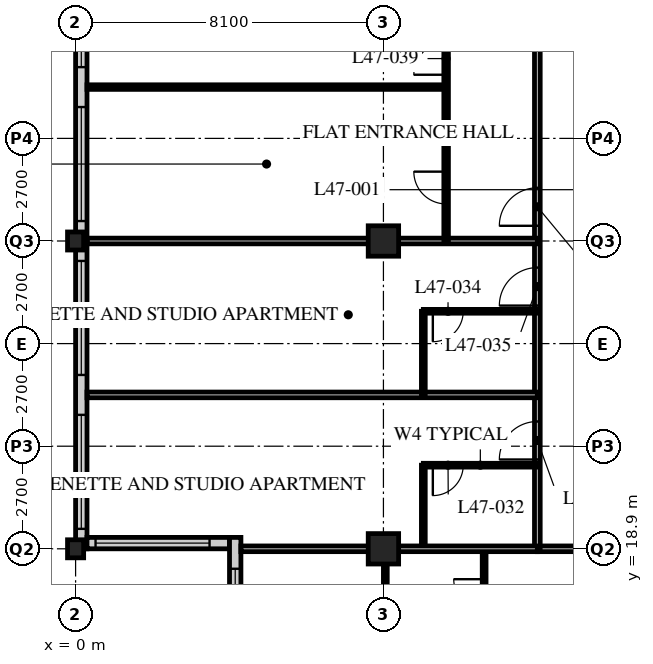
"""IFC4 building model, lengths in metres.
Left out: names, types, materials, properties, quantities, classifications, styles, units other than length and angle.
Written with IfcOpenShell. Run it as: python <this file> out.ifc"""

import sys

from ifc_helpers import new_model, si_unit, direction, frame, frame_2d, origin, origin_2d, place, context, subcontext, project, spatial, rectangle, hollow_rectangle, i_section, extrude, element, fill, save


model = new_model("IFC4")
c1 = context("Model", 3, precision=1e-05, world=origin(), true_north=direction((0.0, 1.0)))
c2 = subcontext(c1, "Body", "Model", "MODEL_VIEW")
j1 = project(units=[si_unit("LENGTHUNIT", "METRE"), si_unit("PLANEANGLEUNIT", "RADIAN")], contexts=[c1])
p1 = place(None, origin())
s1 = spatial("IfcSite", under=j1, at=p1, CompositionType="ELEMENT")
p2 = place(p1, origin())
s2 = spatial("IfcBuilding", under=s1, at=p2, CompositionType="ELEMENT")
p3 = place(p2, frame((0.0, 0.0, 184.8)))
s3 = spatial("IfcBuildingStorey", under=s2, at=p3, CompositionType="ELEMENT", Elevation=184.8)
for number, where, z_axis, x_axis in (
    (1, (0.0, 18.9, 0.0), (0.0, 0.0, 1.0), (1.0, 0.0, 0.0)),
    (2, (0.0, 27.0, 0.0), (0.0, 0.0, 1.0), (1.0, 0.0, 0.0)),
):
    element("IfcColumn", number, at=place(p3, frame(where, z_axis=z_axis, x_axis=x_axis)), inside=s3, PredefinedType="COLUMN", context=c2, shape_type="SweptSolid", body=[
        extrude(i_section(OverallWidth=0.424, OverallDepth=0.475, WebThickness=0.048, FlangeThickness=0.077, FilletRadius=0.015, at=origin_2d()), origin(), (0.0, 0.0, 1.0), 3.6),
    ])
for number, where, z_axis, x_axis in (
    (3, (8.1, 18.9, 0.0), (0.0, 0.0, 1.0), (1.0, 0.0, 0.0)),
    (4, (8.1, 27.0, 0.0), (0.0, 0.0, 1.0), (1.0, 0.0, 0.0)),
):
    element("IfcColumn", number, at=place(p3, frame(where, z_axis=z_axis, x_axis=x_axis)), inside=s3, PredefinedType="COLUMN", context=c2, shape_type="SweptSolid", body=[
        extrude(hollow_rectangle(XDim=0.8, YDim=0.8, WallThickness=0.08, at=origin_2d()), origin(), (0.0, 0.0, 1.0), 3.6),
    ])
p4 = place(p3, frame((0.15, 51.0, 0.0), z_axis=(0.0, 0.0, 1.0), x_axis=(0.0, -1.0, 0.0)))
e5 = element("IfcWall", 5, at=p4, inside=s3, PredefinedType="SOLIDWALL", context=c2, shape_type="SweptSolid", body=[
    extrude(rectangle(XDim=32.1, YDim=0.3, at=frame_2d((16.05, 0.0))), origin(), (0.0, 0.0, 1.0), 3.39),
])
p5 = place(p4, frame((0.225, 0.0, 0.6)))
e6 = element("IfcOpeningElement", 6, at=p5, cuts=e5, PredefinedType="OPENING", context=c2, shape_type="SweptSolid", body=[
    extrude(rectangle(XDim=3.0, YDim=2.4, at=frame_2d((1.5, 1.2))), frame((0.0, 0.16, 0.0), z_axis=(0.0, -1.0, 0.0), x_axis=(1.0, 0.0, 0.0)), (0.0, 0.0, 1.0), 0.32),
])
p6 = place(p4, frame((4.275, 0.0, 0.6)))
e7 = element("IfcOpeningElement", 7, at=p6, cuts=e5, PredefinedType="OPENING", context=c2, shape_type="SweptSolid", body=[
    extrude(rectangle(XDim=3.0, YDim=2.4, at=frame_2d((1.5, 1.2))), frame((0.0, 0.16, 0.0), z_axis=(0.0, -1.0, 0.0), x_axis=(1.0, 0.0, 0.0)), (0.0, 0.0, 1.0), 0.32),
])
p7 = place(p4, frame((8.325, 0.0, 0.6)))
e8 = element("IfcOpeningElement", 8, at=p7, cuts=e5, PredefinedType="OPENING", context=c2, shape_type="SweptSolid", body=[
    extrude(rectangle(XDim=3.0, YDim=2.4, at=frame_2d((1.5, 1.2))), frame((0.0, 0.16, 0.0), z_axis=(0.0, -1.0, 0.0), x_axis=(1.0, 0.0, 0.0)), (0.0, 0.0, 1.0), 0.32),
])
p8 = place(p4, frame((12.375, 0.0, 0.6)))
e9 = element("IfcOpeningElement", 9, at=p8, cuts=e5, PredefinedType="OPENING", context=c2, shape_type="SweptSolid", body=[
    extrude(rectangle(XDim=3.0, YDim=2.4, at=frame_2d((1.5, 1.2))), frame((0.0, 0.16, 0.0), z_axis=(0.0, -1.0, 0.0), x_axis=(1.0, 0.0, 0.0)), (0.0, 0.0, 1.0), 0.32),
])
p9 = place(p4, frame((16.425, 0.0, 0.6)))
e10 = element("IfcOpeningElement", 10, at=p9, cuts=e5, PredefinedType="OPENING", context=c2, shape_type="SweptSolid", body=[
    extrude(rectangle(XDim=3.0, YDim=2.4, at=frame_2d((1.5, 1.2))), frame((0.0, 0.16, 0.0), z_axis=(0.0, -1.0, 0.0), x_axis=(1.0, 0.0, 0.0)), (0.0, 0.0, 1.0), 0.32),
])
p10 = place(p4, frame((20.475, 0.0, 0.6)))
e11 = element("IfcOpeningElement", 11, at=p10, cuts=e5, PredefinedType="OPENING", context=c2, shape_type="SweptSolid", body=[
    extrude(rectangle(XDim=3.0, YDim=2.4, at=frame_2d((1.5, 1.2))), frame((0.0, 0.16, 0.0), z_axis=(0.0, -1.0, 0.0), x_axis=(1.0, 0.0, 0.0)), (0.0, 0.0, 1.0), 0.32),
])
p11 = place(p4, frame((24.525, 0.0, 0.6)))
e12 = element("IfcOpeningElement", 12, at=p11, cuts=e5, PredefinedType="OPENING", context=c2, shape_type="SweptSolid", body=[
    extrude(rectangle(XDim=3.0, YDim=2.4, at=frame_2d((1.5, 1.2))), frame((0.0, 0.16, 0.0), z_axis=(0.0, -1.0, 0.0), x_axis=(1.0, 0.0, 0.0)), (0.0, 0.0, 1.0), 0.32),
])
p12 = place(p4, frame((28.575, 0.0, 0.6)))
e13 = element("IfcOpeningElement", 13, at=p12, cuts=e5, PredefinedType="OPENING", context=c2, shape_type="SweptSolid", body=[
    extrude(rectangle(XDim=3.0, YDim=2.4, at=frame_2d((1.5, 1.2))), frame((0.0, 0.16, 0.0), z_axis=(0.0, -1.0, 0.0), x_axis=(1.0, 0.0, 0.0)), (0.0, 0.0, 1.0), 0.32),
])
p13 = place(p3, frame((0.3, 19.05, 0.0), z_axis=(0.0, 0.0, 1.0), x_axis=(1.0, 0.0, 0.0)))
e14 = element("IfcWall", 14, at=p13, inside=s3, PredefinedType="SOLIDWALL", context=c2, shape_type="SweptSolid", body=[
    extrude(rectangle(XDim=3.75, YDim=0.3, at=frame_2d((1.875, 0.0))), origin(), (0.0, 0.0, 1.0), 3.39),
])
p14 = place(p13, frame((0.225, 0.0, 0.6)))
e15 = element("IfcOpeningElement", 15, at=p14, cuts=e14, PredefinedType="OPENING", context=c2, shape_type="SweptSolid", body=[
    extrude(rectangle(XDim=3.0, YDim=2.0, at=frame_2d((1.5, 1.0))), frame((0.0, 0.16, 0.0), z_axis=(0.0, -1.0, 0.0), x_axis=(1.0, 0.0, 0.0)), (0.0, 0.0, 1.0), 0.32),
])
p15 = place(p3, frame((4.2, 19.2, 0.0), z_axis=(0.0, 0.0, 1.0), x_axis=(0.0, -1.0, 0.0)))
e16 = element("IfcWall", 16, at=p15, inside=s3, PredefinedType="SOLIDWALL", context=c2, shape_type="SweptSolid", body=[
    extrude(rectangle(XDim=4.35, YDim=0.3, at=frame_2d((2.175, 0.0))), origin(), (0.0, 0.0, 1.0), 3.39),
])
p16 = place(p15, frame((0.825, 0.0, 0.6)))
e17 = element("IfcOpeningElement", 17, at=p16, cuts=e16, PredefinedType="OPENING", context=c2, shape_type="SweptSolid", body=[
    extrude(rectangle(XDim=3.0, YDim=2.0, at=frame_2d((1.5, 1.0))), frame((0.0, 0.16, 0.0), z_axis=(0.0, -1.0, 0.0), x_axis=(1.0, 0.0, 0.0)), (0.0, 0.0, 1.0), 0.32),
])
p17 = place(p3, frame((12.15, 18.9, 0.0), z_axis=(0.0, 0.0, 1.0), x_axis=(1.0, 0.0, 0.0)))
e18 = element("IfcWall", 18, at=p17, inside=s3, PredefinedType="PARTITIONING", context=c2, shape_type="SweptSolid", body=[
    extrude(rectangle(XDim=32.4, YDim=0.15, at=frame_2d((16.2, 0.0))), origin(), (0.0, 0.0, 1.0), 2.778),
])
p18 = place(p17, frame((4.95, 0.0, 0.0)))
e19 = element("IfcOpeningElement", 19, at=p18, cuts=e18, PredefinedType="OPENING", context=c2, shape_type="SweptSolid", body=[
    extrude(rectangle(XDim=1.0, YDim=2.1, at=frame_2d((0.5, 1.05))), frame((0.0, 0.085, 0.0), z_axis=(0.0, -1.0, 0.0), x_axis=(1.0, 0.0, 0.0)), (0.0, 0.0, 1.0), 0.17),
])
p19 = place(p17, frame((13.05, 0.0, 0.0)))
e20 = element("IfcOpeningElement", 20, at=p19, cuts=e18, PredefinedType="OPENING", context=c2, shape_type="SweptSolid", body=[
    extrude(rectangle(XDim=1.0, YDim=2.1, at=frame_2d((0.5, 1.05))), frame((0.0, 0.085, 0.0), z_axis=(0.0, -1.0, 0.0), x_axis=(1.0, 0.0, 0.0)), (0.0, 0.0, 1.0), 0.17),
])
p20 = place(p17, frame((21.15, 0.0, 0.0)))
e21 = element("IfcOpeningElement", 21, at=p20, cuts=e18, PredefinedType="OPENING", context=c2, shape_type="SweptSolid", body=[
    extrude(rectangle(XDim=1.0, YDim=2.1, at=frame_2d((0.5, 1.05))), frame((0.0, 0.085, 0.0), z_axis=(0.0, -1.0, 0.0), x_axis=(1.0, 0.0, 0.0)), (0.0, 0.0, 1.0), 0.17),
])
p21 = place(p17, frame((1.525, 0.0, 0.0)))
e22 = element("IfcOpeningElement", 22, at=p21, cuts=e18, PredefinedType="OPENING", context=c2, shape_type="SweptSolid", body=[
    extrude(rectangle(XDim=1.0, YDim=2.1, at=frame_2d((0.5, 1.05))), frame((0.0, 0.085, 0.0), z_axis=(0.0, -1.0, 0.0), x_axis=(1.0, 0.0, 0.0)), (0.0, 0.0, 1.0), 0.17),
])
p22 = place(p17, frame((29.875, 0.0, 0.0)))
e23 = element("IfcOpeningElement", 23, at=p22, cuts=e18, PredefinedType="OPENING", context=c2, shape_type="SweptSolid", body=[
    extrude(rectangle(XDim=1.0, YDim=2.1, at=frame_2d((0.5, 1.05))), frame((0.0, 0.085, 0.0), z_axis=(0.0, -1.0, 0.0), x_axis=(1.0, 0.0, 0.0)), (0.0, 0.0, 1.0), 0.17),
])
p23 = place(p3, frame((12.15, 18.9, 0.0), z_axis=(0.0, 0.0, 1.0), x_axis=(0.0, 1.0, 0.0)))
e24 = element("IfcWall", 24, at=p23, inside=s3, PredefinedType="PARTITIONING", context=c2, shape_type="SweptSolid", body=[
    extrude(rectangle(XDim=28.35, YDim=0.15, at=frame_2d((14.175, 0.0))), origin(), (0.0, 0.0, 1.0), 3.39),
])
p24 = place(p23, frame((2.35, 0.0, 0.0)))
e25 = element("IfcOpeningElement", 25, at=p24, cuts=e24, PredefinedType="OPENING", context=c2, shape_type="SweptSolid", body=[
    extrude(rectangle(XDim=1.0, YDim=2.1, at=frame_2d((0.5, 1.05))), frame((0.0, 0.085, 0.0), z_axis=(0.0, -1.0, 0.0), x_axis=(1.0, 0.0, 0.0)), (0.0, 0.0, 1.0), 0.17),
])
p25 = place(p23, frame((6.4, 0.0, 0.0)))
e26 = element("IfcOpeningElement", 26, at=p25, cuts=e24, PredefinedType="OPENING", context=c2, shape_type="SweptSolid", body=[
    extrude(rectangle(XDim=1.0, YDim=2.1, at=frame_2d((0.5, 1.05))), frame((0.0, 0.085, 0.0), z_axis=(0.0, -1.0, 0.0), x_axis=(1.0, 0.0, 0.0)), (0.0, 0.0, 1.0), 0.17),
])
p26 = place(p23, frame((8.5, 0.0, 0.0)))
e27 = element("IfcOpeningElement", 27, at=p26, cuts=e24, PredefinedType="OPENING", context=c2, shape_type="SweptSolid", body=[
    extrude(rectangle(XDim=1.0, YDim=2.1, at=frame_2d((0.5, 1.05))), frame((0.0, 0.085, 0.0), z_axis=(0.0, -1.0, 0.0), x_axis=(1.0, 0.0, 0.0)), (0.0, 0.0, 1.0), 0.17),
])
p27 = place(p23, frame((16.6, 0.0, 0.0)))
e28 = element("IfcOpeningElement", 28, at=p27, cuts=e24, PredefinedType="OPENING", context=c2, shape_type="SweptSolid", body=[
    extrude(rectangle(XDim=1.0, YDim=2.1, at=frame_2d((0.5, 1.05))), frame((0.0, 0.085, 0.0), z_axis=(0.0, -1.0, 0.0), x_axis=(1.0, 0.0, 0.0)), (0.0, 0.0, 1.0), 0.17),
])
p28 = place(p23, frame((26.65, 0.0, 0.0)))
e29 = element("IfcOpeningElement", 29, at=p28, cuts=e24, PredefinedType="OPENING", context=c2, shape_type="SweptSolid", body=[
    extrude(rectangle(XDim=1.0, YDim=2.1, at=frame_2d((0.5, 1.05))), frame((0.0, 0.085, 0.0), z_axis=(0.0, -1.0, 0.0), x_axis=(1.0, 0.0, 0.0)), (0.0, 0.0, 1.0), 0.17),
])
p29 = place(p3, frame((9.15, 18.9, 0.0), z_axis=(0.0, 0.0, 1.0), x_axis=(0.0, 1.0, 0.0)))
e30 = element("IfcWall", 30, at=p29, inside=s3, PredefinedType="PARTITIONING", context=c2, shape_type="SweptSolid", body=[
    extrude(rectangle(XDim=2.2, YDim=0.1, at=frame_2d((1.1, 0.0))), origin(), (0.0, 0.0, 1.0), 3.39),
])
p30 = place(p3, frame((12.15, 21.1, 0.0), z_axis=(0.0, 0.0, 1.0), x_axis=(-1.0, 0.0, 0.0)))
e31 = element("IfcWall", 31, at=p30, inside=s3, PredefinedType="PARTITIONING", context=c2, shape_type="SweptSolid", body=[
    extrude(rectangle(XDim=3.0, YDim=0.1, at=frame_2d((1.5, 0.0))), origin(), (0.0, 0.0, 1.0), 3.39),
])
p31 = place(p30, frame((1.95, 0.0, 0.0)))
e32 = element("IfcOpeningElement", 32, at=p31, cuts=e31, PredefinedType="OPENING", context=c2, shape_type="SweptSolid", body=[
    extrude(rectangle(XDim=0.8, YDim=2.1, at=frame_2d((0.4, 1.05))), frame((0.0, 0.06, 0.0), z_axis=(0.0, -1.0, 0.0), x_axis=(1.0, 0.0, 0.0)), (0.0, 0.0, 1.0), 0.12),
])
p32 = place(p3, frame((12.15, 22.95, 0.0), z_axis=(0.0, 0.0, 1.0), x_axis=(-1.0, 0.0, 0.0)))
e33 = element("IfcWall", 33, at=p32, inside=s3, PredefinedType="PARTITIONING", context=c2, shape_type="SweptSolid", body=[
    extrude(rectangle(XDim=11.85, YDim=0.15, at=frame_2d((5.925, 0.0))), origin(), (0.0, 0.0, 1.0), 3.39),
])
p33 = place(p3, frame((9.15, 22.95, 0.0), z_axis=(0.0, 0.0, 1.0), x_axis=(0.0, 1.0, 0.0)))
e34 = element("IfcWall", 34, at=p33, inside=s3, PredefinedType="PARTITIONING", context=c2, shape_type="SweptSolid", body=[
    extrude(rectangle(XDim=2.2, YDim=0.1, at=frame_2d((1.1, 0.0))), origin(), (0.0, 0.0, 1.0), 3.39),
])
p34 = place(p3, frame((12.15, 25.15, 0.0), z_axis=(0.0, 0.0, 1.0), x_axis=(-1.0, 0.0, 0.0)))
e35 = element("IfcWall", 35, at=p34, inside=s3, PredefinedType="PARTITIONING", context=c2, shape_type="SweptSolid", body=[
    extrude(rectangle(XDim=3.0, YDim=0.1, at=frame_2d((1.5, 0.0))), origin(), (0.0, 0.0, 1.0), 3.39),
])
p35 = place(p34, frame((1.95, 0.0, 0.0)))
e36 = element("IfcOpeningElement", 36, at=p35, cuts=e35, PredefinedType="OPENING", context=c2, shape_type="SweptSolid", body=[
    extrude(rectangle(XDim=0.8, YDim=2.1, at=frame_2d((0.4, 1.05))), frame((0.0, 0.06, 0.0), z_axis=(0.0, -1.0, 0.0), x_axis=(1.0, 0.0, 0.0)), (0.0, 0.0, 1.0), 0.12),
])
p36 = place(p3, frame((12.15, 27.0, 0.0), z_axis=(0.0, 0.0, 1.0), x_axis=(-1.0, 0.0, 0.0)))
e37 = element("IfcWall", 37, at=p36, inside=s3, PredefinedType="PARTITIONING", context=c2, shape_type="SweptSolid", body=[
    extrude(rectangle(XDim=11.85, YDim=0.15, at=frame_2d((5.925, 0.0))), origin(), (0.0, 0.0, 1.0), 2.778),
])
p37 = place(p3, frame((9.75, 27.0, 0.0), z_axis=(0.0, 0.0, 1.0), x_axis=(0.0, 1.0, 0.0)))
e38 = element("IfcWall", 38, at=p37, inside=s3, PredefinedType="PARTITIONING", context=c2, shape_type="SweptSolid", body=[
    extrude(rectangle(XDim=16.2, YDim=0.12, at=frame_2d((8.1, 0.0))), origin(), (0.0, 0.0, 1.0), 3.39),
])
p38 = place(p37, frame((0.975, 0.0, 0.0)))
e39 = element("IfcOpeningElement", 39, at=p38, cuts=e38, PredefinedType="OPENING", context=c2, shape_type="SweptSolid", body=[
    extrude(rectangle(XDim=0.85, YDim=2.1, at=frame_2d((0.425, 1.05))), frame((0.0, 0.07, 0.0), z_axis=(0.0, -1.0, 0.0), x_axis=(1.0, 0.0, 0.0)), (0.0, 0.0, 1.0), 0.14),
])
p39 = place(p37, frame((4.375, 0.0, 0.0)))
e40 = element("IfcOpeningElement", 40, at=p39, cuts=e38, PredefinedType="OPENING", context=c2, shape_type="SweptSolid", body=[
    extrude(rectangle(XDim=0.85, YDim=2.1, at=frame_2d((0.425, 1.05))), frame((0.0, 0.07, 0.0), z_axis=(0.0, -1.0, 0.0), x_axis=(1.0, 0.0, 0.0)), (0.0, 0.0, 1.0), 0.14),
])
p40 = place(p37, frame((9.075, 0.0, 0.0)))
e41 = element("IfcOpeningElement", 41, at=p40, cuts=e38, PredefinedType="OPENING", context=c2, shape_type="SweptSolid", body=[
    extrude(rectangle(XDim=0.85, YDim=2.1, at=frame_2d((0.425, 1.05))), frame((0.0, 0.07, 0.0), z_axis=(0.0, -1.0, 0.0), x_axis=(1.0, 0.0, 0.0)), (0.0, 0.0, 1.0), 0.14),
])
p41 = place(p37, frame((12.475, 0.0, 0.0)))
e42 = element("IfcOpeningElement", 42, at=p41, cuts=e38, PredefinedType="OPENING", context=c2, shape_type="SweptSolid", body=[
    extrude(rectangle(XDim=0.85, YDim=2.1, at=frame_2d((0.425, 1.05))), frame((0.0, 0.07, 0.0), z_axis=(0.0, -1.0, 0.0), x_axis=(1.0, 0.0, 0.0)), (0.0, 0.0, 1.0), 0.14),
])
p42 = place(p3, frame((9.75, 31.05, 0.0), z_axis=(0.0, 0.0, 1.0), x_axis=(-1.0, 0.0, 0.0)))
e43 = element("IfcWall", 43, at=p42, inside=s3, PredefinedType="PARTITIONING", context=c2, shape_type="SweptSolid", body=[
    extrude(rectangle(XDim=9.45, YDim=0.12, at=frame_2d((4.725, 0.0))), origin(), (0.0, 0.0, 1.0), 3.39),
])
p43 = place(p3, frame((10.75, 18.9, 0.0), z_axis=(0.0, 0.0, 1.0), x_axis=(0.0, -1.0, 0.0)))
e44 = element("IfcWall", 44, at=p43, inside=s3, PredefinedType="PARTITIONING", context=c2, shape_type="SweptSolid", body=[
    extrude(rectangle(XDim=2.4, YDim=0.1, at=frame_2d((1.2, 0.0))), origin(), (0.0, 0.0, 1.0), 3.39),
])
p44 = place(p43, frame((0.8, 0.0, 0.0)))
e45 = element("IfcOpeningElement", 45, at=p44, cuts=e44, PredefinedType="OPENING", context=c2, shape_type="SweptSolid", body=[
    extrude(rectangle(XDim=0.8, YDim=2.1, at=frame_2d((0.4, 1.05))), frame((0.0, 0.06, 0.0), z_axis=(0.0, -1.0, 0.0), x_axis=(1.0, 0.0, 0.0)), (0.0, 0.0, 1.0), 0.12),
])
p45 = place(p3, frame((8.15, 18.9, 0.0), z_axis=(0.0, 0.0, 1.0), x_axis=(0.0, -1.0, 0.0)))
e46 = element("IfcWall", 46, at=p45, inside=s3, PredefinedType="PARTITIONING", context=c2, shape_type="SweptSolid", body=[
    extrude(rectangle(XDim=2.4, YDim=0.1, at=frame_2d((1.2, 0.0))), origin(), (0.0, 0.0, 1.0), 2.778),
])
p46 = place(p3, frame((4.35, 18.9, 0.0), z_axis=(0.0, 0.0, 1.0), x_axis=(1.0, 0.0, 0.0)))
e47 = element("IfcWall", 47, at=p46, inside=s3, PredefinedType="PARTITIONING", context=c2, shape_type="SweptSolid", body=[
    extrude(rectangle(XDim=7.8, YDim=0.15, at=frame_2d((3.9, 0.0))), origin(), (0.0, 0.0, 1.0), 2.778),
])
p47 = place(p9, origin())
e48 = element("IfcWindow", 48, at=p47, inside=s3, PartitioningType="SINGLE_PANEL", PredefinedType="WINDOW", context=c2, shape_type="SweptSolid", body=[
    extrude(rectangle(XDim=3.0, YDim=2.4, at=frame_2d((1.5, 1.2))), frame((0.0, 0.03, 0.0), z_axis=(0.0, -1.0, 0.0), x_axis=(1.0, 0.0, 0.0)), (0.0, 0.0, 1.0), 0.06),
])
fill(e10, e48)
p48 = place(p10, origin())
e49 = element("IfcWindow", 49, at=p48, inside=s3, PartitioningType="SINGLE_PANEL", PredefinedType="WINDOW", context=c2, shape_type="SweptSolid", body=[
    extrude(rectangle(XDim=3.0, YDim=2.4, at=frame_2d((1.5, 1.2))), frame((0.0, 0.03, 0.0), z_axis=(0.0, -1.0, 0.0), x_axis=(1.0, 0.0, 0.0)), (0.0, 0.0, 1.0), 0.06),
])
fill(e11, e49)
p49 = place(p11, origin())
e50 = element("IfcWindow", 50, at=p49, inside=s3, PartitioningType="SINGLE_PANEL", PredefinedType="WINDOW", context=c2, shape_type="SweptSolid", body=[
    extrude(rectangle(XDim=3.0, YDim=2.4, at=frame_2d((1.5, 1.2))), frame((0.0, 0.03, 0.0), z_axis=(0.0, -1.0, 0.0), x_axis=(1.0, 0.0, 0.0)), (0.0, 0.0, 1.0), 0.06),
])
fill(e12, e50)
p50 = place(p12, origin())
e51 = element("IfcWindow", 51, at=p50, inside=s3, PartitioningType="SINGLE_PANEL", PredefinedType="WINDOW", context=c2, shape_type="SweptSolid", body=[
    extrude(rectangle(XDim=3.0, YDim=2.4, at=frame_2d((1.5, 1.2))), frame((0.0, 0.03, 0.0), z_axis=(0.0, -1.0, 0.0), x_axis=(1.0, 0.0, 0.0)), (0.0, 0.0, 1.0), 0.06),
])
fill(e13, e51)
p51 = place(p14, origin())
e52 = element("IfcWindow", 52, at=p51, inside=s3, PartitioningType="SINGLE_PANEL", PredefinedType="WINDOW", context=c2, shape_type="SweptSolid", body=[
    extrude(rectangle(XDim=3.0, YDim=2.0, at=frame_2d((1.5, 1.0))), frame((0.0, 0.03, 0.0), z_axis=(0.0, -1.0, 0.0), x_axis=(1.0, 0.0, 0.0)), (0.0, 0.0, 1.0), 0.06),
])
fill(e15, e52)
p52 = place(p16, origin())
e53 = element("IfcWindow", 53, at=p52, inside=s3, PartitioningType="SINGLE_PANEL", PredefinedType="WINDOW", context=c2, shape_type="SweptSolid", body=[
    extrude(rectangle(XDim=3.0, YDim=2.0, at=frame_2d((1.5, 1.0))), frame((0.0, 0.03, 0.0), z_axis=(0.0, -1.0, 0.0), x_axis=(1.0, 0.0, 0.0)), (0.0, 0.0, 1.0), 0.06),
])
fill(e17, e53)
p53 = place(p31, origin())
e54 = element("IfcDoor", 54, at=p53, inside=s3, OperationType="SINGLE_SWING_RIGHT", PredefinedType="DOOR", context=c2, shape_type="SweptSolid", body=[
    extrude(rectangle(XDim=0.8, YDim=2.1, at=frame_2d((0.4, 1.05))), frame((0.0, 0.025, 0.0), z_axis=(0.0, -1.0, 0.0), x_axis=(1.0, 0.0, 0.0)), (0.0, 0.0, 1.0), 0.05),
])
fill(e32, e54)
p54 = place(p24, origin())
e55 = element("IfcDoor", 55, at=p54, inside=s3, OperationType="SINGLE_SWING_LEFT", PredefinedType="DOOR", context=c2, shape_type="SweptSolid", body=[
    extrude(rectangle(XDim=1.0, YDim=2.1, at=frame_2d((0.5, 1.05))), frame((0.0, 0.025, 0.0), z_axis=(0.0, -1.0, 0.0), x_axis=(1.0, 0.0, 0.0)), (0.0, 0.0, 1.0), 0.05),
])
fill(e25, e55)
p55 = place(p35, origin())
e56 = element("IfcDoor", 56, at=p55, inside=s3, OperationType="SINGLE_SWING_RIGHT", PredefinedType="DOOR", context=c2, shape_type="SweptSolid", body=[
    extrude(rectangle(XDim=0.8, YDim=2.1, at=frame_2d((0.4, 1.05))), frame((0.0, 0.025, 0.0), z_axis=(0.0, -1.0, 0.0), x_axis=(1.0, 0.0, 0.0)), (0.0, 0.0, 1.0), 0.05),
])
fill(e36, e56)
p56 = place(p25, origin())
e57 = element("IfcDoor", 57, at=p56, inside=s3, OperationType="SINGLE_SWING_LEFT", PredefinedType="DOOR", context=c2, shape_type="SweptSolid", body=[
    extrude(rectangle(XDim=1.0, YDim=2.1, at=frame_2d((0.5, 1.05))), frame((0.0, 0.025, 0.0), z_axis=(0.0, -1.0, 0.0), x_axis=(1.0, 0.0, 0.0)), (0.0, 0.0, 1.0), 0.05),
])
fill(e26, e57)
p57 = place(p26, origin())
e58 = element("IfcDoor", 58, at=p57, inside=s3, OperationType="SINGLE_SWING_LEFT", PredefinedType="DOOR", context=c2, shape_type="SweptSolid", body=[
    extrude(rectangle(XDim=1.0, YDim=2.1, at=frame_2d((0.5, 1.05))), frame((0.0, 0.025, 0.0), z_axis=(0.0, -1.0, 0.0), x_axis=(1.0, 0.0, 0.0)), (0.0, 0.0, 1.0), 0.05),
])
fill(e27, e58)
p58 = place(p38, origin())
e59 = element("IfcDoor", 59, at=p58, inside=s3, OperationType="SINGLE_SWING_RIGHT", PredefinedType="DOOR", context=c2, shape_type="SweptSolid", body=[
    extrude(rectangle(XDim=0.85, YDim=2.1, at=frame_2d((0.425, 1.05))), frame((0.0, 0.025, 0.0), z_axis=(0.0, -1.0, 0.0), x_axis=(1.0, 0.0, 0.0)), (0.0, 0.0, 1.0), 0.05),
])
fill(e39, e59)
p59 = place(p39, origin())
e60 = element("IfcDoor", 60, at=p59, inside=s3, OperationType="SINGLE_SWING_LEFT", PredefinedType="DOOR", context=c2, shape_type="SweptSolid", body=[
    extrude(rectangle(XDim=0.85, YDim=2.1, at=frame_2d((0.425, 1.05))), frame((0.0, 0.025, 0.0), z_axis=(0.0, -1.0, 0.0), x_axis=(1.0, 0.0, 0.0)), (0.0, 0.0, 1.0), 0.05),
])
fill(e40, e60)
p60 = place(p44, origin())
e61 = element("IfcDoor", 61, at=p60, inside=s3, OperationType="SINGLE_SWING_RIGHT", PredefinedType="DOOR", context=c2, shape_type="SweptSolid", body=[
    extrude(rectangle(XDim=0.8, YDim=2.1, at=frame_2d((0.4, 1.05))), frame((0.0, 0.025, 0.0), z_axis=(0.0, -1.0, 0.0), x_axis=(1.0, 0.0, 0.0)), (0.0, 0.0, 1.0), 0.05),
])
fill(e45, e61)
save(model, sys.argv[1])
